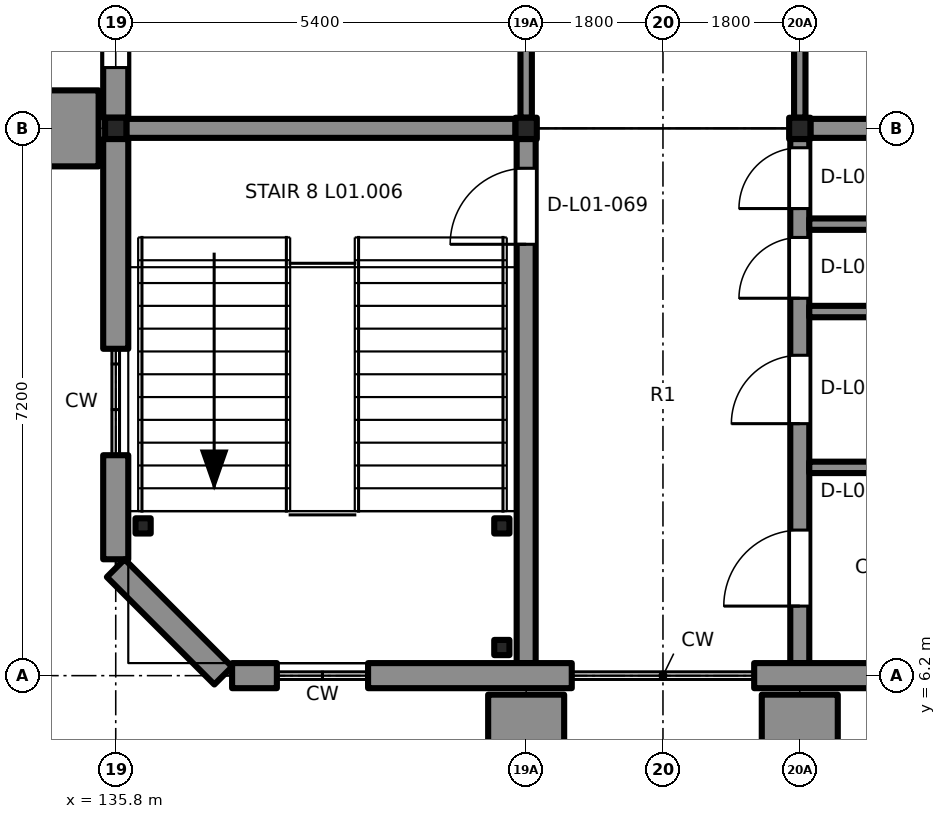
"""IFC4 building model, lengths in metres.
Left out: names, types, materials, properties, quantities, classifications, styles, units other than length and angle.
Written with IfcOpenShell. Run it as: python <this file> out.ifc"""

import sys

from ifc_helpers import new_model, si_unit, direction, frame, frame_2d, origin, origin_2d, place, context, subcontext, project, spatial, rectangle, extrude, element, fill, save


model = new_model("IFC4")
c1 = context("Model", 3, precision=1e-05, world=origin(), true_north=direction((0.0, 1.0)))
c2 = subcontext(c1, "Body", "Model", "MODEL_VIEW")
j1 = project(units=[si_unit("LENGTHUNIT", "METRE"), si_unit("PLANEANGLEUNIT", "RADIAN")], contexts=[c1])
p1 = place(None, origin())
s1 = spatial("IfcSite", under=j1, at=p1, CompositionType="ELEMENT")
p2 = place(p1, origin())
s2 = spatial("IfcBuilding", under=s1, at=p2, CompositionType="ELEMENT")
p3 = place(p2, frame((0.0, 0.0, 6.3)))
s3 = spatial("IfcBuildingStorey", under=s2, at=p3, CompositionType="ELEMENT", Elevation=6.3)
for number, where, z_axis, x_axis in (
    (1, (135.8, 13.4, 0.0), (0.0, 0.0, 1.0), (1.0, 0.0, 0.0)),
    (2, (141.2, 13.4, 0.0), (0.0, 0.0, 1.0), (1.0, 0.0, 0.0)),
    (3, (144.8, 13.4, 0.0), (0.0, 0.0, 1.0), (1.0, 0.0, 0.0)),
):
    element("IfcColumn", number, at=place(p3, frame(where, z_axis=z_axis, x_axis=x_axis)), inside=s3, PredefinedType="COLUMN", context=c2, shape_type="SweptSolid", body=[
        extrude(rectangle(XDim=0.28, YDim=0.28, at=origin_2d()), origin(), (0.0, 0.0, 1.0), 3.9),
    ])
p4 = place(p3, frame((141.2, 6.365, 0.0), z_axis=(0.0, 0.0, 1.0), x_axis=(0.0, 1.0, 0.0)))
e4 = element("IfcWall", 4, at=p4, inside=s3, PredefinedType="SHEAR", context=c2, shape_type="SweptSolid", body=[
    extrude(rectangle(XDim=6.895, YDim=0.25, at=frame_2d((3.448, 0.0))), origin(), (0.0, 0.0, 1.0), 3.65),
])
p5 = place(p4, frame((5.51, 0.0, 0.0)))
e5 = element("IfcOpeningElement", 5, at=p5, cuts=e4, PredefinedType="OPENING", context=c2, shape_type="SweptSolid", body=[
    extrude(rectangle(XDim=1.0, YDim=2.1, at=frame_2d((0.5, 1.05))), frame((0.0, 0.135, 0.0), z_axis=(0.0, -1.0, 0.0), x_axis=(1.0, 0.0, 0.0)), (0.0, 0.0, 1.0), 0.27),
])
p6 = place(p3, frame((135.94, 13.4, 0.0), z_axis=(0.0, 0.0, 1.0), x_axis=(1.0, 0.0, 0.0)))
e6 = element("IfcWall", 6, at=p6, inside=s3, PredefinedType="SHEAR", context=c2, shape_type="SweptSolid", body=[
    extrude(rectangle(XDim=5.12, YDim=0.25, at=frame_2d((2.56, 0.0))), origin(), (0.0, 0.0, 1.0), 3.65),
])
p7 = place(p3, frame((144.8, 6.365, 0.0), z_axis=(0.0, 0.0, 1.0), x_axis=(0.0, 1.0, 0.0)))
e7 = element("IfcWall", 7, at=p7, inside=s3, PredefinedType="SHEAR", context=c2, shape_type="SweptSolid", body=[
    extrude(rectangle(XDim=6.895, YDim=0.25, at=frame_2d((3.448, 0.0))), origin(), (0.0, 0.0, 1.0), 3.65),
])
p8 = place(p7, frame((0.75, 0.0, 0.0)))
e8 = element("IfcOpeningElement", 8, at=p8, cuts=e7, PredefinedType="OPENING", context=c2, shape_type="SweptSolid", body=[
    extrude(rectangle(XDim=1.0, YDim=2.1, at=frame_2d((0.5, 1.05))), frame((0.0, 0.135, 0.0), z_axis=(0.0, -1.0, 0.0), x_axis=(1.0, 0.0, 0.0)), (0.0, 0.0, 1.0), 0.27),
])
p9 = place(p7, frame((3.15, 0.0, 0.0)))
e9 = element("IfcOpeningElement", 9, at=p9, cuts=e7, PredefinedType="OPENING", context=c2, shape_type="SweptSolid", body=[
    extrude(rectangle(XDim=0.9, YDim=2.1, at=frame_2d((0.45, 1.05))), frame((0.0, 0.135, 0.0), z_axis=(0.0, -1.0, 0.0), x_axis=(1.0, 0.0, 0.0)), (0.0, 0.0, 1.0), 0.27),
])
p10 = place(p7, frame((4.8, 0.0, 0.0)))
e10 = element("IfcOpeningElement", 10, at=p10, cuts=e7, PredefinedType="OPENING", context=c2, shape_type="SweptSolid", body=[
    extrude(rectangle(XDim=0.8, YDim=2.1, at=frame_2d((0.4, 1.05))), frame((0.0, 0.135, 0.0), z_axis=(0.0, -1.0, 0.0), x_axis=(1.0, 0.0, 0.0)), (0.0, 0.0, 1.0), 0.27),
])
p11 = place(p7, frame((5.98, 0.0, 0.0)))
e11 = element("IfcOpeningElement", 11, at=p11, cuts=e7, PredefinedType="OPENING", context=c2, shape_type="SweptSolid", body=[
    extrude(rectangle(XDim=0.8, YDim=2.1, at=frame_2d((0.4, 1.05))), frame((0.0, 0.135, 0.0), z_axis=(0.0, -1.0, 0.0), x_axis=(1.0, 0.0, 0.0)), (0.0, 0.0, 1.0), 0.27),
])
p12 = place(p3, frame((144.94, 13.4, 0.0), z_axis=(0.0, 0.0, 1.0), x_axis=(1.0, 0.0, 0.0)))
e12 = element("IfcWall", 12, at=p12, inside=s3, PredefinedType="SHEAR", context=c2, shape_type="SweptSolid", body=[
    extrude(rectangle(XDim=5.12, YDim=0.25, at=frame_2d((2.56, 0.0))), origin(), (0.0, 0.0, 1.0), 3.65),
])
for number, where, z_axis, x_axis in (
    (13, (144.925, 8.94, 0.0), (0.0, 0.0, 1.0), (1.0, 0.0, 0.0)),
    (14, (144.925, 10.99, 0.0), (0.0, 0.0, 1.0), (1.0, 0.0, 0.0)),
    (15, (144.925, 12.14, 0.0), (0.0, 0.0, 1.0), (1.0, 0.0, 0.0)),
):
    element("IfcWall", number, at=place(p3, frame(where, z_axis=z_axis, x_axis=x_axis)), inside=s3, PredefinedType="PARTITIONING", context=c2, shape_type="SweptSolid", body=[
        extrude(rectangle(XDim=5.11, YDim=0.15, at=frame_2d((2.555, 0.0))), origin(), (0.0, 0.0, 1.0), 3.65),
    ])
for number, where, z_axis, x_axis in (
    (16, (140.88, 6.57, 0.0), (0.0, 0.0, 1.0), (1.0, 0.0, 0.0)),
    (17, (136.16, 8.17, 0.0), (0.0, 0.0, 1.0), (1.0, 0.0, 0.0)),
    (18, (140.88, 8.17, 0.0), (0.0, 0.0, 1.0), (1.0, 0.0, 0.0)),
):
    element("IfcColumn", number, at=place(p3, frame(where, z_axis=z_axis, x_axis=x_axis)), inside=s3, PredefinedType="COLUMN", context=c2, shape_type="SweptSolid", body=[
        extrude(rectangle(XDim=0.2, YDim=0.2, at=origin_2d()), origin(), (0.0, 0.0, 1.0), 1.75),
    ])
p13 = place(p3, frame((135.8, 7.731, 0.0), z_axis=(0.0, 0.0, 1.0), x_axis=(0.0, 1.0, 0.0)))
e19 = element("IfcWall", 19, at=p13, inside=s3, PredefinedType="SOLIDWALL", context=c2, shape_type="SweptSolid", body=[
    extrude(rectangle(XDim=1.369, YDim=0.33, at=frame_2d((0.685, 0.0))), origin(), (0.0, 0.0, 1.0), 3.22),
])
p14 = place(p3, frame((135.8, 10.5, 0.0), z_axis=(0.0, 0.0, 1.0), x_axis=(0.0, 1.0, 0.0)))
e20 = element("IfcWall", 20, at=p14, inside=s3, PredefinedType="SOLIDWALL", context=c2, shape_type="SweptSolid", body=[
    extrude(rectangle(XDim=2.76, YDim=0.33, at=frame_2d((1.38, 0.0))), origin(), (0.0, 0.0, 1.0), 3.22),
])
p15 = place(p3, frame((135.8, 13.54, 0.0), z_axis=(0.0, 0.0, 1.0), x_axis=(0.0, 1.0, 0.0)))
e21 = element("IfcWall", 21, at=p15, inside=s3, PredefinedType="SOLIDWALL", context=c2, shape_type="SweptSolid", body=[
    extrude(rectangle(XDim=6.92, YDim=0.33, at=frame_2d((3.46, 0.0))), origin(), (0.0, 0.0, 1.0), 3.22),
])
p16 = place(p15, frame((0.66, 0.0, 0.6)))
e22 = element("IfcOpeningElement", 22, at=p16, cuts=e21, PredefinedType="OPENING", context=c2, shape_type="SweptSolid", body=[
    extrude(rectangle(XDim=0.9, YDim=2.4, at=frame_2d((0.45, 1.2))), frame((0.0, 0.175, 0.0), z_axis=(0.0, -1.0, 0.0), x_axis=(1.0, 0.0, 0.0)), (0.0, 0.0, 1.0), 0.35),
])
p17 = place(p15, frame((1.76, 0.0, 0.6)))
e23 = element("IfcOpeningElement", 23, at=p17, cuts=e21, PredefinedType="OPENING", context=c2, shape_type="SweptSolid", body=[
    extrude(rectangle(XDim=0.9, YDim=2.4, at=frame_2d((0.45, 1.2))), frame((0.0, 0.175, 0.0), z_axis=(0.0, -1.0, 0.0), x_axis=(1.0, 0.0, 0.0)), (0.0, 0.0, 1.0), 0.35),
])
p18 = place(p15, frame((4.26, 0.0, 0.6)))
e24 = element("IfcOpeningElement", 24, at=p18, cuts=e21, PredefinedType="OPENING", context=c2, shape_type="SweptSolid", body=[
    extrude(rectangle(XDim=0.9, YDim=2.4, at=frame_2d((0.45, 1.2))), frame((0.0, 0.175, 0.0), z_axis=(0.0, -1.0, 0.0), x_axis=(1.0, 0.0, 0.0)), (0.0, 0.0, 1.0), 0.35),
])
p19 = place(p15, frame((5.36, 0.0, 0.6)))
e25 = element("IfcOpeningElement", 25, at=p19, cuts=e21, PredefinedType="OPENING", context=c2, shape_type="SweptSolid", body=[
    extrude(rectangle(XDim=0.9, YDim=2.4, at=frame_2d((0.45, 1.2))), frame((0.0, 0.175, 0.0), z_axis=(0.0, -1.0, 0.0), x_axis=(1.0, 0.0, 0.0)), (0.0, 0.0, 1.0), 0.35),
])
p20 = place(p3, frame((135.2, 12.9, 0.0), z_axis=(0.0, 0.0, 1.0), x_axis=(0.0, 1.0, 0.0)))
e26 = element("IfcWall", 26, at=p20, inside=s3, PredefinedType="SOLIDWALL", context=c2, shape_type="SweptSolid", body=[
    extrude(rectangle(XDim=1.0, YDim=0.75, at=frame_2d((0.5, 0.0))), origin(), (0.0, 0.0, 1.0), 3.9),
])
p21 = place(p3, frame((137.92, 6.2, 0.0), z_axis=(0.0, 0.0, 1.0), x_axis=(-1.0, 0.0, 0.0)))
e27 = element("IfcWall", 27, at=p21, inside=s3, PredefinedType="SOLIDWALL", context=c2, shape_type="SweptSolid", body=[
    extrude(rectangle(XDim=0.589, YDim=0.33, at=frame_2d((0.294, 0.0))), origin(), (0.0, 0.0, 1.0), 3.2),
])
p22 = place(p3, frame((141.8, 6.2, 0.0), z_axis=(0.0, 0.0, 1.0), x_axis=(-1.0, 0.0, 0.0)))
e28 = element("IfcWall", 28, at=p22, inside=s3, PredefinedType="SOLIDWALL", context=c2, shape_type="SweptSolid", body=[
    extrude(rectangle(XDim=2.68, YDim=0.33, at=frame_2d((1.34, 0.0))), origin(), (0.0, 0.0, 1.0), 3.2),
])
p23 = place(p3, frame((148.669, 6.2, 0.0), z_axis=(0.0, 0.0, 1.0), x_axis=(-1.0, 0.0, 0.0)))
e29 = element("IfcWall", 29, at=p23, inside=s3, PredefinedType="SOLIDWALL", context=c2, shape_type="SweptSolid", body=[
    extrude(rectangle(XDim=4.469, YDim=0.33, at=frame_2d((2.234, 0.0))), origin(), (0.0, 0.0, 1.0), 3.2),
])
for number, where, z_axis, x_axis in (
    (30, (141.7, 5.575, 0.0), (0.0, 0.0, 1.0), (-1.0, 0.0, 0.0)),
    (31, (145.3, 5.575, 0.0), (0.0, 0.0, 1.0), (-1.0, 0.0, 0.0)),
):
    element("IfcWall", number, at=place(p3, frame(where, z_axis=z_axis, x_axis=x_axis)), inside=s3, PredefinedType="SOLIDWALL", context=c2, shape_type="SweptSolid", body=[
        extrude(rectangle(XDim=1.0, YDim=0.75, at=frame_2d((0.5, 0.0))), origin(), (0.0, 0.0, 1.0), 3.9),
    ])
p24 = place(p3, frame((135.8, 7.614, 0.0), z_axis=(0.0, 0.0, 1.0), x_axis=(0.707106781187, -0.707106781187, 0.0)))
e32 = element("IfcWall", 32, at=p24, inside=s3, PredefinedType="SOLIDWALL", context=c2, shape_type="SweptSolid", body=[
    extrude(rectangle(XDim=2.0, YDim=0.33, at=frame_2d((1.0, 0.0))), origin(), (0.0, 0.0, 1.0), 3.2),
])
p25 = place(p3, frame((141.2, 13.54, 0.0), z_axis=(0.0, 0.0, 1.0), x_axis=(0.0, 1.0, 0.0)))
e33 = element("IfcWall", 33, at=p25, inside=s3, PredefinedType="PARTITIONING", context=c2, shape_type="SweptSolid", body=[
    extrude(rectangle(XDim=6.92, YDim=0.15, at=frame_2d((3.46, 0.0))), origin(), (0.0, 0.0, 1.0), 3.22),
])
p26 = place(p25, frame((1.16, 0.0, 0.0)))
e34 = element("IfcOpeningElement", 34, at=p26, cuts=e33, PredefinedType="OPENING", context=c2, shape_type="SweptSolid", body=[
    extrude(rectangle(XDim=1.0, YDim=2.1, at=frame_2d((0.5, 1.05))), frame((0.0, 0.085, 0.0), z_axis=(0.0, -1.0, 0.0), x_axis=(1.0, 0.0, 0.0)), (0.0, 0.0, 1.0), 0.17),
])
p27 = place(p3, frame((144.8, 17.0, 0.0), z_axis=(0.0, 0.0, 1.0), x_axis=(0.0, -1.0, 0.0)))
e35 = element("IfcWall", 35, at=p27, inside=s3, PredefinedType="PARTITIONING", context=c2, shape_type="SweptSolid", body=[
    extrude(rectangle(XDim=3.46, YDim=0.15, at=frame_2d((1.73, 0.0))), origin(), (0.0, 0.0, 1.0), 3.22),
])
p28 = place(p27, frame((1.3, 0.0, 0.0)))
e36 = element("IfcOpeningElement", 36, at=p28, cuts=e35, PredefinedType="OPENING", context=c2, shape_type="SweptSolid", body=[
    extrude(rectangle(XDim=1.0, YDim=2.1, at=frame_2d((0.5, 1.05))), frame((0.0, 0.085, 0.0), z_axis=(0.0, -1.0, 0.0), x_axis=(1.0, 0.0, 0.0)), (0.0, 0.0, 1.0), 0.17),
])
p29 = place(p5, origin())
e37 = element("IfcDoor", 37, at=p29, inside=s3, OperationType="SINGLE_SWING_RIGHT", PredefinedType="DOOR", context=c2, shape_type="SweptSolid", body=[
    extrude(rectangle(XDim=1.0, YDim=2.1, at=frame_2d((0.5, 1.05))), frame((0.0, 0.025, 0.0), z_axis=(0.0, -1.0, 0.0), x_axis=(1.0, 0.0, 0.0)), (0.0, 0.0, 1.0), 0.05),
])
fill(e5, e37)
p30 = place(p8, origin())
e38 = element("IfcDoor", 38, at=p30, inside=s3, OperationType="SINGLE_SWING_LEFT", PredefinedType="DOOR", context=c2, shape_type="SweptSolid", body=[
    extrude(rectangle(XDim=1.0, YDim=2.1, at=frame_2d((0.5, 1.05))), frame((0.0, 0.025, 0.0), z_axis=(0.0, -1.0, 0.0), x_axis=(1.0, 0.0, 0.0)), (0.0, 0.0, 1.0), 0.05),
])
fill(e8, e38)
p31 = place(p9, origin())
e39 = element("IfcDoor", 39, at=p31, inside=s3, OperationType="SINGLE_SWING_LEFT", PredefinedType="DOOR", context=c2, shape_type="SweptSolid", body=[
    extrude(rectangle(XDim=0.9, YDim=2.1, at=frame_2d((0.45, 1.05))), frame((0.0, 0.025, 0.0), z_axis=(0.0, -1.0, 0.0), x_axis=(1.0, 0.0, 0.0)), (0.0, 0.0, 1.0), 0.05),
])
fill(e9, e39)
p32 = place(p10, origin())
e40 = element("IfcDoor", 40, at=p32, inside=s3, OperationType="SINGLE_SWING_LEFT", PredefinedType="DOOR", context=c2, shape_type="SweptSolid", body=[
    extrude(rectangle(XDim=0.8, YDim=2.1, at=frame_2d((0.4, 1.05))), frame((0.0, 0.025, 0.0), z_axis=(0.0, -1.0, 0.0), x_axis=(1.0, 0.0, 0.0)), (0.0, 0.0, 1.0), 0.05),
])
fill(e10, e40)
p33 = place(p11, origin())
e41 = element("IfcDoor", 41, at=p33, inside=s3, OperationType="SINGLE_SWING_LEFT", PredefinedType="DOOR", context=c2, shape_type="SweptSolid", body=[
    extrude(rectangle(XDim=0.8, YDim=2.1, at=frame_2d((0.4, 1.05))), frame((0.0, 0.025, 0.0), z_axis=(0.0, -1.0, 0.0), x_axis=(1.0, 0.0, 0.0)), (0.0, 0.0, 1.0), 0.05),
])
fill(e11, e41)
p34 = place(p16, origin())
e42 = element("IfcWindow", 42, at=p34, inside=s3, PartitioningType="SINGLE_PANEL", PredefinedType="WINDOW", context=c2, shape_type="SweptSolid", body=[
    extrude(rectangle(XDim=0.9, YDim=2.4, at=frame_2d((0.45, 1.2))), frame((0.0, -0.03, 0.0), z_axis=(0.0, -1.0, 0.0), x_axis=(1.0, 0.0, 0.0)), (0.0, 0.0, 1.0), 0.06),
])
fill(e22, e42)
save(model, sys.argv[1])
